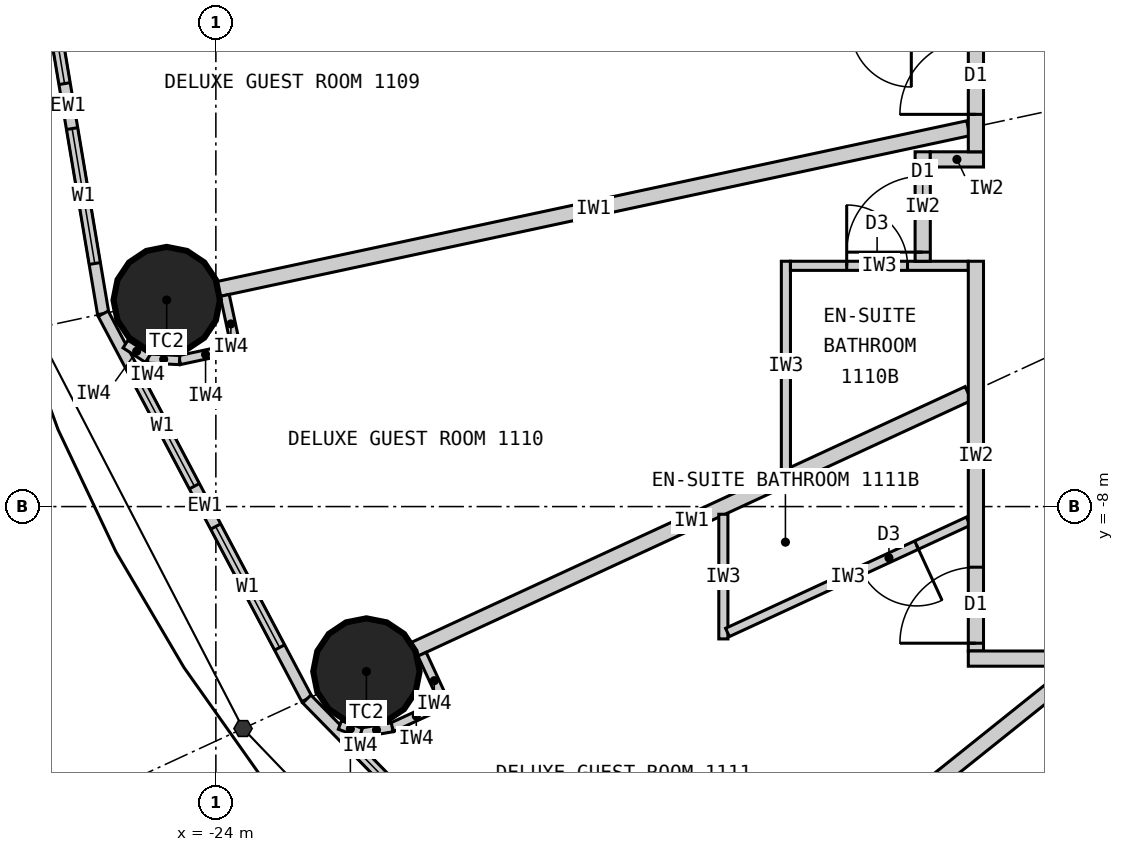
"""IFC4 building model, lengths in metres.
Left out: names, types, materials, properties, quantities, classifications, styles, units other than length and angle.
Written with IfcOpenShell. Run it as: python <this file> out.ifc"""

import sys

from ifc_helpers import new_model, si_unit, direction, frame, frame_2d, origin, origin_2d, place, context, subcontext, project, spatial, rectangle, circle, extrude, element, fill, save


model = new_model("IFC4")
c1 = context("Model", 3, precision=1e-05, world=origin(), true_north=direction((0.0, 1.0)))
c2 = subcontext(c1, "Body", "Model", "MODEL_VIEW")
j1 = project(units=[si_unit("LENGTHUNIT", "METRE"), si_unit("PLANEANGLEUNIT", "RADIAN")], contexts=[c1])
p1 = place(None, origin())
s1 = spatial("IfcSite", under=j1, at=p1, CompositionType="ELEMENT")
p2 = place(p1, origin())
s2 = spatial("IfcBuilding", under=s1, at=p2, CompositionType="ELEMENT")
p3 = place(p2, frame((0.0, 0.0, 50.7)))
s3 = spatial("IfcBuildingStorey", under=s2, at=p3, CompositionType="ELEMENT", Elevation=50.7)
for number, where, z_axis, x_axis in (
    (1, (-24.647, -5.283, 0.0), (0.0, 0.0, 1.0), (1.0, 0.0, 0.0)),
    (2, (-22.019, -10.17, 0.0), (0.0, 0.0, 1.0), (1.0, 0.0, 0.0)),
):
    element("IfcColumn", number, at=place(p3, frame(where, z_axis=z_axis, x_axis=x_axis)), inside=s3, PredefinedType="COLUMN", context=c2, shape_type="SweptSolid", body=[
        extrude(circle(Radius=0.7, at=origin_2d()), origin(), (0.0, 0.0, 1.0), 3.3),
    ])
p4 = place(p3, frame((-26.4, 0.0, 0.0), z_axis=(0.0, 0.0, 1.0), x_axis=(0.165642551694, -0.986185857264, 0.0)))
e3 = element("IfcWall", 3, at=p4, inside=s3, PredefinedType="ELEMENTEDWALL", context=c2, shape_type="SweptSolid", body=[
    extrude(rectangle(XDim=5.539, YDim=0.15, at=frame_2d((2.77, 0.0))), origin(), (0.0, 0.0, 1.0), 3.12),
])
p5 = place(p4, frame((0.669, 0.0, 0.9)))
e4 = element("IfcOpeningElement", 4, at=p5, cuts=e3, PredefinedType="OPENING", context=c2, shape_type="SweptSolid", body=[
    extrude(rectangle(XDim=1.8, YDim=1.9, at=frame_2d((0.9, 0.95))), frame((0.0, 0.085, 0.0), z_axis=(0.0, -1.0, 0.0), x_axis=(1.0, 0.0, 0.0)), (0.0, 0.0, 1.0), 0.17),
])
p6 = place(p4, frame((3.07, 0.0, 0.9)))
e5 = element("IfcOpeningElement", 5, at=p6, cuts=e3, PredefinedType="OPENING", context=c2, shape_type="SweptSolid", body=[
    extrude(rectangle(XDim=1.8, YDim=1.9, at=frame_2d((0.9, 0.95))), frame((0.0, 0.085, 0.0), z_axis=(0.0, -1.0, 0.0), x_axis=(1.0, 0.0, 0.0)), (0.0, 0.0, 1.0), 0.17),
])
p7 = place(p3, frame((-25.482, -5.462, 0.0), z_axis=(0.0, 0.0, 1.0), x_axis=(0.467296867008, -0.884100468321, 0.0)))
e6 = element("IfcWall", 6, at=p7, inside=s3, PredefinedType="ELEMENTEDWALL", context=c2, shape_type="SweptSolid", body=[
    extrude(rectangle(XDim=5.734, YDim=0.15, at=frame_2d((2.867, 0.0))), origin(), (0.0, 0.0, 1.0), 3.12),
])
p8 = place(p7, frame((0.767, 0.0, 0.9)))
e7 = element("IfcOpeningElement", 7, at=p8, cuts=e6, PredefinedType="OPENING", context=c2, shape_type="SweptSolid", body=[
    extrude(rectangle(XDim=1.8, YDim=1.9, at=frame_2d((0.9, 0.95))), frame((0.0, 0.085, 0.0), z_axis=(0.0, -1.0, 0.0), x_axis=(1.0, 0.0, 0.0)), (0.0, 0.0, 1.0), 0.17),
])
p9 = place(p7, frame((3.167, 0.0, 0.9)))
e8 = element("IfcOpeningElement", 8, at=p9, cuts=e6, PredefinedType="OPENING", context=c2, shape_type="SweptSolid", body=[
    extrude(rectangle(XDim=1.8, YDim=1.9, at=frame_2d((0.9, 0.95))), frame((0.0, 0.085, 0.0), z_axis=(0.0, -1.0, 0.0), x_axis=(1.0, 0.0, 0.0)), (0.0, 0.0, 1.0), 0.17),
])
p10 = place(p3, frame((-22.803, -10.532, 0.0), z_axis=(0.0, 0.0, 1.0), x_axis=(0.699602905915, -0.714531856557, 0.0)))
e9 = element("IfcWall", 9, at=p10, inside=s3, PredefinedType="ELEMENTEDWALL", context=c2, shape_type="SweptSolid", body=[
    extrude(rectangle(XDim=6.051, YDim=0.15, at=frame_2d((3.025, 0.0))), origin(), (0.0, 0.0, 1.0), 3.12),
])
p11 = place(p10, frame((0.926, 0.0, 0.9)))
e10 = element("IfcOpeningElement", 10, at=p11, cuts=e9, PredefinedType="OPENING", context=c2, shape_type="SweptSolid", body=[
    extrude(rectangle(XDim=1.8, YDim=1.9, at=frame_2d((0.9, 0.95))), frame((0.0, 0.085, 0.0), z_axis=(0.0, -1.0, 0.0), x_axis=(1.0, 0.0, 0.0)), (0.0, 0.0, 1.0), 0.17),
])
p12 = place(p10, frame((3.325, 0.0, 0.9)))
e11 = element("IfcOpeningElement", 11, at=p12, cuts=e9, PredefinedType="OPENING", context=c2, shape_type="SweptSolid", body=[
    extrude(rectangle(XDim=1.8, YDim=1.9, at=frame_2d((0.9, 0.95))), frame((0.0, 0.085, 0.0), z_axis=(0.0, -1.0, 0.0), x_axis=(1.0, 0.0, 0.0)), (0.0, 0.0, 1.0), 0.17),
])
p13 = place(p3, frame((-14.1, -3.022, 0.0), z_axis=(0.0, 0.0, 1.0), x_axis=(-0.977790014929, -0.209586943072, 0.0)))
e12 = element("IfcWall", 12, at=p13, inside=s3, PredefinedType="PARTITIONING", context=c2, shape_type="SweptSolid", body=[
    extrude(rectangle(XDim=10.087, YDim=0.2, at=frame_2d((5.043, 0.0))), origin(), (0.0, 0.0, 1.0), 2.32),
])
p14 = place(p3, frame((-14.1, -6.512, 0.0), z_axis=(0.0, 0.0, 1.0), x_axis=(-0.907832871056, -0.419332181247, 0.0)))
e13 = element("IfcWall", 13, at=p14, inside=s3, PredefinedType="PARTITIONING", context=c2, shape_type="SweptSolid", body=[
    extrude(rectangle(XDim=8.023, YDim=0.2, at=frame_2d((4.011, 0.0))), origin(), (0.0, 0.0, 1.0), 2.32),
])
p15 = place(p3, frame((-12.625, -10.1, 0.0), z_axis=(0.0, 0.0, 1.0), x_axis=(-0.780892451574, -0.624665493744, 0.0)))
e14 = element("IfcWall", 14, at=p15, inside=s3, PredefinedType="PARTITIONING", context=c2, shape_type="SweptSolid", body=[
    extrude(rectangle(XDim=6.045, YDim=0.2, at=frame_2d((3.022, 0.0))), origin(), (0.0, 0.0, 1.0), 2.32),
])
p16 = place(p3, frame((-16.5, -7.521, 0.0), z_axis=(0.0, 0.0, 1.0), x_axis=(0.0, 1.0, 0.0)))
e15 = element("IfcWall", 15, at=p16, inside=s3, PredefinedType="PARTITIONING", context=c2, shape_type="SweptSolid", body=[
    extrude(rectangle(XDim=2.749, YDim=0.12, at=frame_2d((1.374, 0.0))), origin(), (0.0, 0.0, 1.0), 3.12),
])
p17 = place(p3, frame((-14.1, -4.833, 0.0), z_axis=(0.0, 0.0, 1.0), x_axis=(-1.0, 0.0, 0.0)))
e16 = element("IfcWall", 16, at=p17, inside=s3, PredefinedType="PARTITIONING", context=c2, shape_type="SweptSolid", body=[
    extrude(rectangle(XDim=2.34, YDim=0.12, at=frame_2d((1.17, 0.0))), origin(), (0.0, 0.0, 1.0), 3.12),
])
p18 = place(p17, frame((0.8, 0.0, 0.0)))
e17 = element("IfcOpeningElement", 17, at=p18, cuts=e16, PredefinedType="OPENING", context=c2, shape_type="SweptSolid", body=[
    extrude(rectangle(XDim=0.8, YDim=2.1, at=frame_2d((0.4, 1.05))), frame((0.0, 0.07, 0.0), z_axis=(0.0, -1.0, 0.0), x_axis=(1.0, 0.0, 0.0)), (0.0, 0.0, 1.0), 0.14),
])
p19 = place(p3, frame((-17.323, -8.101, 0.0), z_axis=(0.0, 0.0, 1.0), x_axis=(0.0, -1.0, 0.0)))
e18 = element("IfcWall", 18, at=p19, inside=s3, PredefinedType="PARTITIONING", context=c2, shape_type="SweptSolid", body=[
    extrude(rectangle(XDim=1.64, YDim=0.12, at=frame_2d((0.82, 0.0))), origin(), (0.0, 0.0, 1.0), 3.12),
])
p20 = place(p3, frame((-14.1, -8.193, 0.0), z_axis=(0.0, 0.0, 1.0), x_axis=(-0.907836493557, -0.419324338628, 0.0)))
e19 = element("IfcWall", 19, at=p20, inside=s3, PredefinedType="PARTITIONING", context=c2, shape_type="SweptSolid", body=[
    extrude(rectangle(XDim=3.49, YDim=0.12, at=frame_2d((1.745, 0.0))), origin(), (0.0, 0.0, 1.0), 3.12),
])
p21 = place(p20, frame((0.75, 0.0, 0.0)))
e20 = element("IfcOpeningElement", 20, at=p21, cuts=e19, PredefinedType="OPENING", context=c2, shape_type="SweptSolid", body=[
    extrude(rectangle(XDim=0.8, YDim=2.1, at=frame_2d((0.4, 1.05))), frame((0.0, 0.07, 0.0), z_axis=(0.0, -1.0, 0.0), x_axis=(1.0, 0.0, 0.0)), (0.0, 0.0, 1.0), 0.14),
])
p22 = place(p3, frame((-14.7, -3.333, 0.0), z_axis=(0.0, 0.0, 1.0), x_axis=(0.0, -1.0, 0.0)))
e21 = element("IfcWall", 21, at=p22, inside=s3, PredefinedType="PARTITIONING", context=c2, shape_type="SweptSolid", body=[
    extrude(rectangle(XDim=1.44, YDim=0.2, at=frame_2d((0.72, 0.0))), origin(), (0.0, 0.0, 1.0), 3.12),
])
p23 = place(p22, frame((0.32, 0.0, 0.0)))
e22 = element("IfcOpeningElement", 22, at=p23, cuts=e21, PredefinedType="OPENING", context=c2, shape_type="SweptSolid", body=[
    extrude(rectangle(XDim=1.0, YDim=2.2, at=frame_2d((0.5, 1.1))), frame((0.0, 0.11, 0.0), z_axis=(0.0, -1.0, 0.0), x_axis=(1.0, 0.0, 0.0)), (0.0, 0.0, 1.0), 0.22),
])
p24 = place(p3, frame((-13.9, -3.433, 0.0), z_axis=(0.0, 0.0, 1.0), x_axis=(-1.0, 0.0, 0.0)))
e23 = element("IfcWall", 23, at=p24, inside=s3, PredefinedType="PARTITIONING", context=c2, shape_type="SweptSolid", body=[
    extrude(rectangle(XDim=0.7, YDim=0.2, at=frame_2d((0.35, 0.0))), origin(), (0.0, 0.0, 1.0), 2.32),
])
p25 = place(p3, frame((-14.0, 3.333, 0.0), z_axis=(0.0, 0.0, 1.0), x_axis=(0.0, -1.0, 0.0)))
e24 = element("IfcWall", 24, at=p25, inside=s3, PredefinedType="PARTITIONING", context=c2, shape_type="SweptSolid", body=[
    extrude(rectangle(XDim=6.665, YDim=0.2, at=frame_2d((3.333, 0.0))), origin(), (0.0, 0.0, 1.0), 3.12),
])
p26 = place(p25, frame((2.15, 0.0, 0.0)))
e25 = element("IfcOpeningElement", 25, at=p26, cuts=e24, PredefinedType="OPENING", context=c2, shape_type="SweptSolid", body=[
    extrude(rectangle(XDim=1.0, YDim=2.2, at=frame_2d((0.5, 1.1))), frame((0.0, 0.11, 0.0), z_axis=(0.0, -1.0, 0.0), x_axis=(1.0, 0.0, 0.0)), (0.0, 0.0, 1.0), 0.22),
])
p27 = place(p25, frame((5.173, 0.0, 0.0)))
e26 = element("IfcOpeningElement", 26, at=p27, cuts=e24, PredefinedType="OPENING", context=c2, shape_type="SweptSolid", body=[
    extrude(rectangle(XDim=1.0, YDim=2.2, at=frame_2d((0.5, 1.1))), frame((0.0, 0.11, 0.0), z_axis=(0.0, -1.0, 0.0), x_axis=(1.0, 0.0, 0.0)), (0.0, 0.0, 1.0), 0.22),
])
p28 = place(p3, frame((-14.0, -4.772, 0.0), z_axis=(0.0, 0.0, 1.0), x_axis=(0.0, -1.0, 0.0)))
e27 = element("IfcWall", 27, at=p28, inside=s3, PredefinedType="PARTITIONING", context=c2, shape_type="SweptSolid", body=[
    extrude(rectangle(XDim=5.127, YDim=0.2, at=frame_2d((2.564, 0.0))), origin(), (0.0, 0.0, 1.0), 3.12),
])
p29 = place(p28, frame((4.025, 0.0, 0.0)))
e28 = element("IfcOpeningElement", 28, at=p29, cuts=e27, PredefinedType="OPENING", context=c2, shape_type="SweptSolid", body=[
    extrude(rectangle(XDim=1.0, YDim=2.2, at=frame_2d((0.5, 1.1))), frame((0.0, 0.11, 0.0), z_axis=(0.0, -1.0, 0.0), x_axis=(1.0, 0.0, 0.0)), (0.0, 0.0, 1.0), 0.22),
])
p30 = place(p3, frame((-10.885, -10.0, 0.0), z_axis=(0.0, 0.0, 1.0), x_axis=(-1.0, 0.0, 0.0)))
e29 = element("IfcWall", 29, at=p30, inside=s3, PredefinedType="PARTITIONING", context=c2, shape_type="SweptSolid", body=[
    extrude(rectangle(XDim=3.215, YDim=0.2, at=frame_2d((1.607, 0.0))), origin(), (0.0, 0.0, 1.0), 3.12),
])
p31 = place(p3, frame((-23.883, -5.222, 0.0), z_axis=(0.0, 0.0, 1.0), x_axis=(0.209311842415, -0.977848941619, 0.0)))
e30 = element("IfcWall", 30, at=p31, inside=s3, PredefinedType="PARTITIONING", context=c2, shape_type="SweptSolid", body=[
    extrude(rectangle(XDim=0.768, YDim=0.12, at=frame_2d((0.384, 0.0))), origin(), (0.0, 0.0, 1.0), 3.12),
])
p32 = place(p3, frame((-23.793, -5.926, 0.0), z_axis=(0.0, 0.0, 1.0), x_axis=(-0.977792206673, -0.209576717621, 0.0)))
e31 = element("IfcWall", 31, at=p32, inside=s3, PredefinedType="PARTITIONING", context=c2, shape_type="SweptSolid", body=[
    extrude(rectangle(XDim=0.7, YDim=0.12, at=frame_2d((0.35, 0.0))), origin(), (0.0, 0.0, 1.0), 3.12),
])
p33 = place(p3, frame((-24.478, -6.073, 0.0), z_axis=(0.0, 0.0, 1.0), x_axis=(-0.998708262812, 0.05081147302, 0.0)))
e32 = element("IfcWall", 32, at=p33, inside=s3, PredefinedType="PARTITIONING", context=c2, shape_type="SweptSolid", body=[
    extrude(rectangle(XDim=0.418, YDim=0.12, at=frame_2d((0.209, 0.0))), origin(), (0.0, 0.0, 1.0), 3.12),
])
p34 = place(p3, frame((-24.895, -6.052, 0.0), z_axis=(0.0, 0.0, 1.0), x_axis=(-0.839495197275, 0.54336710772, 0.0)))
e33 = element("IfcWall", 33, at=p34, inside=s3, PredefinedType="PARTITIONING", context=c2, shape_type="SweptSolid", body=[
    extrude(rectangle(XDim=0.35, YDim=0.12, at=frame_2d((0.175, 0.0))), origin(), (0.0, 0.0, 1.0), 3.12),
])
p35 = place(p3, frame((-21.287, -9.942, 0.0), z_axis=(0.0, 0.0, 1.0), x_axis=(0.419259891039, -0.907866258744, 0.0)))
e34 = element("IfcWall", 34, at=p35, inside=s3, PredefinedType="PARTITIONING", context=c2, shape_type="SweptSolid", body=[
    extrude(rectangle(XDim=0.768, YDim=0.12, at=frame_2d((0.384, 0.0))), origin(), (0.0, 0.0, 1.0), 3.12),
])
p36 = place(p3, frame((-21.045, -10.61, 0.0), z_axis=(0.0, 0.0, 1.0), x_axis=(-0.907877701396, -0.419235112208, 0.0)))
e35 = element("IfcWall", 35, at=p36, inside=s3, PredefinedType="PARTITIONING", context=c2, shape_type="SweptSolid", body=[
    extrude(rectangle(XDim=0.7, YDim=0.12, at=frame_2d((0.35, 0.0))), origin(), (0.0, 0.0, 1.0), 3.12),
])
p37 = place(p3, frame((-21.68, -10.903, 0.0), z_axis=(0.0, 0.0, 1.0), x_axis=(-0.985446622073, -0.169985161247, 0.0)))
e36 = element("IfcWall", 36, at=p37, inside=s3, PredefinedType="PARTITIONING", context=c2, shape_type="SweptSolid", body=[
    extrude(rectangle(XDim=0.418, YDim=0.12, at=frame_2d((0.209, 0.0))), origin(), (0.0, 0.0, 1.0), 3.12),
])
p38 = place(p3, frame((-22.092, -10.974, 0.0), z_axis=(0.0, 0.0, 1.0), x_axis=(-0.938428160676, 0.345474437912, 0.0)))
e37 = element("IfcWall", 37, at=p38, inside=s3, PredefinedType="PARTITIONING", context=c2, shape_type="SweptSolid", body=[
    extrude(rectangle(XDim=0.294, YDim=0.12, at=frame_2d((0.147, 0.0))), origin(), (0.0, 0.0, 1.0), 3.12),
])
p39 = place(p5, origin())
e38 = element("IfcWindow", 38, at=p39, inside=s3, PartitioningType="SINGLE_PANEL", PredefinedType="WINDOW", context=c2, shape_type="SweptSolid", body=[
    extrude(rectangle(XDim=1.8, YDim=1.9, at=frame_2d((0.9, 0.95))), frame((0.0, 0.03, 0.0), z_axis=(0.0, -1.0, 0.0), x_axis=(1.0, 0.0, 0.0)), (0.0, 0.0, 1.0), 0.06),
])
fill(e4, e38)
p40 = place(p6, origin())
e39 = element("IfcWindow", 39, at=p40, inside=s3, PartitioningType="SINGLE_PANEL", PredefinedType="WINDOW", context=c2, shape_type="SweptSolid", body=[
    extrude(rectangle(XDim=1.8, YDim=1.9, at=frame_2d((0.9, 0.95))), frame((0.0, 0.03, 0.0), z_axis=(0.0, -1.0, 0.0), x_axis=(1.0, 0.0, 0.0)), (0.0, 0.0, 1.0), 0.06),
])
fill(e5, e39)
p41 = place(p8, origin())
e40 = element("IfcWindow", 40, at=p41, inside=s3, PartitioningType="SINGLE_PANEL", PredefinedType="WINDOW", context=c2, shape_type="SweptSolid", body=[
    extrude(rectangle(XDim=1.8, YDim=1.9, at=frame_2d((0.9, 0.95))), frame((0.0, 0.03, 0.0), z_axis=(0.0, -1.0, 0.0), x_axis=(1.0, 0.0, 0.0)), (0.0, 0.0, 1.0), 0.06),
])
fill(e7, e40)
p42 = place(p9, origin())
e41 = element("IfcWindow", 41, at=p42, inside=s3, PartitioningType="SINGLE_PANEL", PredefinedType="WINDOW", context=c2, shape_type="SweptSolid", body=[
    extrude(rectangle(XDim=1.8, YDim=1.9, at=frame_2d((0.9, 0.95))), frame((0.0, 0.03, 0.0), z_axis=(0.0, -1.0, 0.0), x_axis=(1.0, 0.0, 0.0)), (0.0, 0.0, 1.0), 0.06),
])
fill(e8, e41)
p43 = place(p11, origin())
e42 = element("IfcWindow", 42, at=p43, inside=s3, PartitioningType="SINGLE_PANEL", PredefinedType="WINDOW", context=c2, shape_type="SweptSolid", body=[
    extrude(rectangle(XDim=1.8, YDim=1.9, at=frame_2d((0.9, 0.95))), frame((0.0, 0.03, 0.0), z_axis=(0.0, -1.0, 0.0), x_axis=(1.0, 0.0, 0.0)), (0.0, 0.0, 1.0), 0.06),
])
fill(e10, e42)
p44 = place(p27, origin())
e43 = element("IfcDoor", 43, at=p44, inside=s3, OperationType="SINGLE_SWING_RIGHT", PredefinedType="DOOR", context=c2, shape_type="SweptSolid", body=[
    extrude(rectangle(XDim=1.0, YDim=2.2, at=frame_2d((0.5, 1.1))), frame((0.0, 0.025, 0.0), z_axis=(0.0, -1.0, 0.0), x_axis=(1.0, 0.0, 0.0)), (0.0, 0.0, 1.0), 0.05),
])
fill(e26, e43)
p45 = place(p18, origin())
e44 = element("IfcDoor", 44, at=p45, inside=s3, OperationType="SINGLE_SWING_RIGHT", PredefinedType="DOOR", context=c2, shape_type="SweptSolid", body=[
    extrude(rectangle(XDim=0.8, YDim=2.1, at=frame_2d((0.4, 1.05))), frame((0.0, 0.025, 0.0), z_axis=(0.0, -1.0, 0.0), x_axis=(1.0, 0.0, 0.0)), (0.0, 0.0, 1.0), 0.05),
])
fill(e17, e44)
p46 = place(p23, origin())
e45 = element("IfcDoor", 45, at=p46, inside=s3, OperationType="SINGLE_SWING_RIGHT", PredefinedType="DOOR", context=c2, shape_type="SweptSolid", body=[
    extrude(rectangle(XDim=1.0, YDim=2.2, at=frame_2d((0.5, 1.1))), frame((0.0, 0.025, 0.0), z_axis=(0.0, -1.0, 0.0), x_axis=(1.0, 0.0, 0.0)), (0.0, 0.0, 1.0), 0.05),
])
fill(e22, e45)
p47 = place(p21, origin())
e46 = element("IfcDoor", 46, at=p47, inside=s3, OperationType="SINGLE_SWING_LEFT", PredefinedType="DOOR", context=c2, shape_type="SweptSolid", body=[
    extrude(rectangle(XDim=0.8, YDim=2.1, at=frame_2d((0.4, 1.05))), frame((0.0, 0.025, 0.0), z_axis=(0.0, -1.0, 0.0), x_axis=(1.0, 0.0, 0.0)), (0.0, 0.0, 1.0), 0.05),
])
fill(e20, e46)
p48 = place(p29, origin())
e47 = element("IfcDoor", 47, at=p48, inside=s3, OperationType="SINGLE_SWING_RIGHT", PredefinedType="DOOR", context=c2, shape_type="SweptSolid", body=[
    extrude(rectangle(XDim=1.0, YDim=2.2, at=frame_2d((0.5, 1.1))), frame((0.0, 0.025, 0.0), z_axis=(0.0, -1.0, 0.0), x_axis=(1.0, 0.0, 0.0)), (0.0, 0.0, 1.0), 0.05),
])
fill(e28, e47)
save(model, sys.argv[1])
